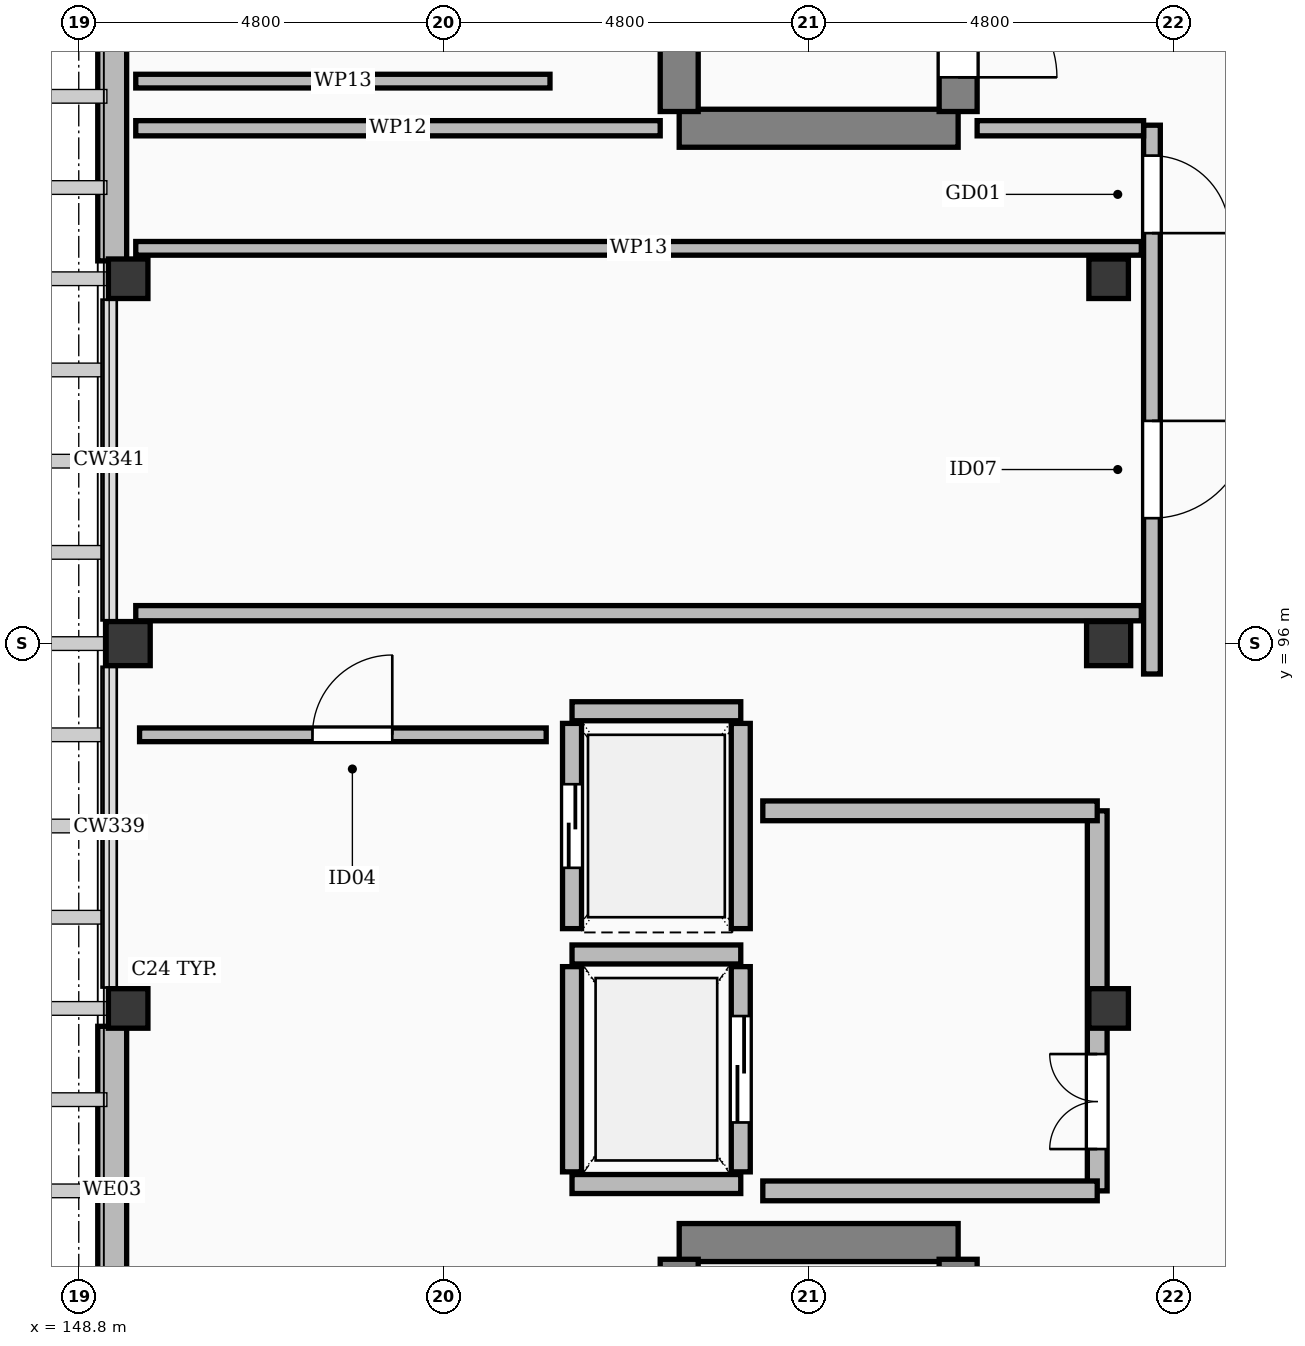
"""IFC4 building model, lengths in metres.
Left out: names, types, materials, properties, quantities, classifications, styles, units other than length and angle.
Written with IfcOpenShell. Run it as: python <this file> out.ifc"""

import sys

from ifc_helpers import new_model, si_unit, direction, frame, frame_2d, origin, origin_2d, place, context, subcontext, project, spatial, rectangle, extrude, element, fill, save


model = new_model("IFC4")
c1 = context("Model", 3, precision=1e-05, world=origin(), true_north=direction((0.0, 1.0)))
c2 = subcontext(c1, "Body", "Model", "MODEL_VIEW")
j1 = project(units=[si_unit("LENGTHUNIT", "METRE"), si_unit("PLANEANGLEUNIT", "RADIAN")], contexts=[c1])
p1 = place(None, origin())
s1 = spatial("IfcSite", under=j1, at=p1, CompositionType="ELEMENT")
p2 = place(p1, origin())
s2 = spatial("IfcBuilding", under=s1, at=p2, CompositionType="ELEMENT")
p3 = place(p2, frame((0.0, 0.0, 46.5)))
s3 = spatial("IfcBuildingStorey", under=s2, at=p3, CompositionType="ELEMENT", Elevation=46.5)
for number, where, z_axis, x_axis in (
    (1, (149.45, 96.0, 0.0), (0.0, 0.0, 1.0), (1.0, 0.0, 0.0)),
    (2, (162.35, 96.0, 0.0), (0.0, 0.0, 1.0), (1.0, 0.0, 0.0)),
):
    element("IfcColumn", number, at=place(p3, frame(where, z_axis=z_axis, x_axis=x_axis)), inside=s3, PredefinedType="COLUMN", context=c2, shape_type="SweptSolid", body=[
        extrude(rectangle(XDim=0.58, YDim=0.58, at=origin_2d()), origin(), (0.0, 0.0, 1.0), 3.9),
    ])
for number, where, z_axis, x_axis in (
    (3, (149.45, 91.2, 0.0), (0.0, 0.0, 1.0), (1.0, 0.0, 0.0)),
    (4, (149.45, 100.8, 0.0), (0.0, 0.0, 1.0), (1.0, 0.0, 0.0)),
    (5, (162.35, 91.2, 0.0), (0.0, 0.0, 1.0), (1.0, 0.0, 0.0)),
    (6, (162.35, 100.8, 0.0), (0.0, 0.0, 1.0), (1.0, 0.0, 0.0)),
):
    element("IfcColumn", number, at=place(p3, frame(where, z_axis=z_axis, x_axis=x_axis)), inside=s3, PredefinedType="COLUMN", context=c2, shape_type="SweptSolid", body=[
        extrude(rectangle(XDim=0.52, YDim=0.52, at=origin_2d()), origin(), (0.0, 0.0, 1.0), 3.9),
    ])
for number, where, z_axis, x_axis in (
    (7, (149.24, 86.665, 0.0), (0.0, 0.0, 1.0), (0.0, 1.0, 0.0)),
    (8, (149.24, 101.035, 0.0), (0.0, 0.0, 1.0), (0.0, 1.0, 0.0)),
):
    element("IfcWall", number, at=place(p3, frame(where, z_axis=z_axis, x_axis=x_axis)), inside=s3, PredefinedType="SOLIDWALL", context=c2, shape_type="SweptSolid", body=[
        extrude(rectangle(XDim=4.3, YDim=0.38, at=frame_2d((2.15, 0.0))), origin(), (0.0, 0.0, 1.0), 3.072),
    ])
p4 = place(p3, frame((156.7, 88.12, 0.0), z_axis=(0.0, 0.0, 1.0), x_axis=(1.0, 0.0, 0.0)))
e9 = element("IfcWall", 9, at=p4, inside=s3, PredefinedType="SHEAR", context=c2, shape_type="SweptSolid", body=[
    extrude(rectangle(XDim=3.67, YDim=0.5, at=frame_2d((1.835, 0.0))), origin(), (0.0, 0.0, 1.0), 3.68),
])
p5 = place(p3, frame((156.7, 77.4, 0.0), z_axis=(0.0, 0.0, 1.0), x_axis=(0.0, 1.0, 0.0)))
e10 = element("IfcWall", 10, at=p5, inside=s3, PredefinedType="SHEAR", context=c2, shape_type="SweptSolid", body=[
    extrude(rectangle(XDim=10.5, YDim=0.5, at=frame_2d((5.25, 0.0))), origin(), (0.0, 0.0, 1.0), 3.68),
])
p6 = place(p3, frame((160.37, 77.4, 0.0), z_axis=(0.0, 0.0, 1.0), x_axis=(0.0, 1.0, 0.0)))
e11 = element("IfcWall", 11, at=p6, inside=s3, PredefinedType="SHEAR", context=c2, shape_type="SweptSolid", body=[
    extrude(rectangle(XDim=10.5, YDim=0.5, at=frame_2d((5.25, 0.0))), origin(), (0.0, 0.0, 1.0), 3.68),
])
p7 = place(p6, frame((0.45, 0.0, 0.0)))
e12 = element("IfcOpeningElement", 12, at=p7, cuts=e11, PredefinedType="OPENING", context=c2, shape_type="SweptSolid", body=[
    extrude(rectangle(XDim=1.3, YDim=2.15, at=frame_2d((0.65, 1.075))), frame((0.0, 0.262, 0.0), z_axis=(0.0, -1.0, 0.0), x_axis=(1.0, 0.0, 0.0)), (0.0, 0.0, 1.0), 0.524),
])
for number, where, z_axis, x_axis in (
    (13, (155.29, 88.89, 0.0), (0.0, 0.0, 1.0), (1.0, 0.0, 0.0)),
    (14, (155.29, 91.91, 0.0), (0.0, 0.0, 1.0), (1.0, 0.0, 0.0)),
):
    element("IfcWall", number, at=place(p3, frame(where, z_axis=z_axis, x_axis=x_axis)), inside=s3, PredefinedType="SOLIDWALL", context=c2, shape_type="SweptSolid", body=[
        extrude(rectangle(XDim=2.22, YDim=0.25, at=frame_2d((1.11, 0.0))), origin(), (0.0, 0.0, 1.0), 3.68),
    ])
p8 = place(p3, frame((155.29, 89.05, 0.0), z_axis=(0.0, 0.0, 1.0), x_axis=(0.0, 1.0, 0.0)))
e15 = element("IfcWall", 15, at=p8, inside=s3, PredefinedType="SOLIDWALL", context=c2, shape_type="SweptSolid", body=[
    extrude(rectangle(XDim=2.7, YDim=0.25, at=frame_2d((1.35, 0.0))), origin(), (0.0, 0.0, 1.0), 3.072),
])
p9 = place(p3, frame((157.51, 89.05, 0.0), z_axis=(0.0, 0.0, 1.0), x_axis=(0.0, 1.0, 0.0)))
e16 = element("IfcWall", 16, at=p9, inside=s3, PredefinedType="SOLIDWALL", context=c2, shape_type="SweptSolid", body=[
    extrude(rectangle(XDim=2.7, YDim=0.25, at=frame_2d((1.35, 0.0))), origin(), (0.0, 0.0, 1.0), 3.072),
])
p10 = place(p9, frame((0.65, 0.0, 0.0)))
e17 = element("IfcOpeningElement", 17, at=p10, cuts=e16, PredefinedType="OPENING", context=c2, shape_type="SweptSolid", body=[
    extrude(rectangle(XDim=1.4, YDim=2.3, at=frame_2d((0.7, 1.15))), frame((0.0, 0.137, 0.0), z_axis=(0.0, -1.0, 0.0), x_axis=(1.0, 0.0, 0.0)), (0.0, 0.0, 1.0), 0.274),
])
p11 = place(p3, frame((155.29, 95.11, 0.0), z_axis=(0.0, 0.0, 1.0), x_axis=(1.0, 0.0, 0.0)))
e18 = element("IfcWall", 18, at=p11, inside=s3, PredefinedType="SOLIDWALL", context=c2, shape_type="SweptSolid", body=[
    extrude(rectangle(XDim=2.22, YDim=0.25, at=frame_2d((1.11, 0.0))), origin(), (0.0, 0.0, 1.0), 3.68),
])
p12 = place(p3, frame((155.29, 92.25, 0.0), z_axis=(0.0, 0.0, 1.0), x_axis=(0.0, 1.0, 0.0)))
e19 = element("IfcWall", 19, at=p12, inside=s3, PredefinedType="SOLIDWALL", context=c2, shape_type="SweptSolid", body=[
    extrude(rectangle(XDim=2.7, YDim=0.25, at=frame_2d((1.35, 0.0))), origin(), (0.0, 0.0, 1.0), 3.68),
])
p13 = place(p12, frame((0.8, 0.0, 0.0)))
e20 = element("IfcOpeningElement", 20, at=p13, cuts=e19, PredefinedType="OPENING", context=c2, shape_type="SweptSolid", body=[
    extrude(rectangle(XDim=1.1, YDim=2.2, at=frame_2d((0.55, 1.1))), frame((0.0, 0.137, 0.0), z_axis=(0.0, -1.0, 0.0), x_axis=(1.0, 0.0, 0.0)), (0.0, 0.0, 1.0), 0.274),
])
p14 = place(p3, frame((157.51, 92.25, 0.0), z_axis=(0.0, 0.0, 1.0), x_axis=(0.0, 1.0, 0.0)))
e21 = element("IfcWall", 21, at=p14, inside=s3, PredefinedType="SOLIDWALL", context=c2, shape_type="SweptSolid", body=[
    extrude(rectangle(XDim=2.7, YDim=0.25, at=frame_2d((1.35, 0.0))), origin(), (0.0, 0.0, 1.0), 3.68),
])
p15 = place(p3, frame((162.2, 88.8, 0.0), z_axis=(0.0, 0.0, 1.0), x_axis=(0.0, 1.0, 0.0)))
e22 = element("IfcWall", 22, at=p15, inside=s3, PredefinedType="SOLIDWALL", context=c2, shape_type="SweptSolid", body=[
    extrude(rectangle(XDim=5.0, YDim=0.26, at=frame_2d((2.5, 0.0))), origin(), (0.0, 0.0, 1.0), 3.072),
])
p16 = place(p15, frame((0.55, 0.0, 0.0)))
e23 = element("IfcOpeningElement", 23, at=p16, cuts=e22, PredefinedType="OPENING", context=c2, shape_type="SweptSolid", body=[
    extrude(rectangle(XDim=1.25, YDim=2.15, at=frame_2d((0.625, 1.075))), frame((0.0, 0.142, 0.0), z_axis=(0.0, -1.0, 0.0), x_axis=(1.0, 0.0, 0.0)), (0.0, 0.0, 1.0), 0.284),
])
for number, where, z_axis, x_axis in (
    (24, (157.8, 88.8, 0.0), (0.0, 0.0, 1.0), (1.0, 0.0, 0.0)),
    (25, (157.8, 93.8, 0.0), (0.0, 0.0, 1.0), (1.0, 0.0, 0.0)),
):
    element("IfcWall", number, at=place(p3, frame(where, z_axis=z_axis, x_axis=x_axis)), inside=s3, PredefinedType="SOLIDWALL", context=c2, shape_type="SweptSolid", body=[
        extrude(rectangle(XDim=4.4, YDim=0.26, at=frame_2d((2.2, 0.0))), origin(), (0.0, 0.0, 1.0), 3.072),
    ])
p17 = place(p3, frame((156.7, 102.78, 0.0), z_axis=(0.0, 0.0, 1.0), x_axis=(1.0, 0.0, 0.0)))
e26 = element("IfcWall", 26, at=p17, inside=s3, PredefinedType="SHEAR", context=c2, shape_type="SweptSolid", body=[
    extrude(rectangle(XDim=3.67, YDim=0.5, at=frame_2d((1.835, 0.0))), origin(), (0.0, 0.0, 1.0), 3.68),
])
p18 = place(p3, frame((156.7, 103.0, 0.0), z_axis=(0.0, 0.0, 1.0), x_axis=(0.0, 1.0, 0.0)))
e27 = element("IfcWall", 27, at=p18, inside=s3, PredefinedType="SHEAR", context=c2, shape_type="SweptSolid", body=[
    extrude(rectangle(XDim=10.5, YDim=0.5, at=frame_2d((5.25, 0.0))), origin(), (0.0, 0.0, 1.0), 3.68),
])
p19 = place(p3, frame((160.37, 103.0, 0.0), z_axis=(0.0, 0.0, 1.0), x_axis=(0.0, 1.0, 0.0)))
e28 = element("IfcWall", 28, at=p19, inside=s3, PredefinedType="SHEAR", context=c2, shape_type="SweptSolid", body=[
    extrude(rectangle(XDim=10.5, YDim=0.5, at=frame_2d((5.25, 0.0))), origin(), (0.0, 0.0, 1.0), 3.68),
])
p20 = place(p19, frame((0.45, 0.0, 0.0)))
e29 = element("IfcOpeningElement", 29, at=p20, cuts=e28, PredefinedType="OPENING", context=c2, shape_type="SweptSolid", body=[
    extrude(rectangle(XDim=1.3, YDim=2.15, at=frame_2d((0.65, 1.075))), frame((0.0, 0.262, 0.0), z_axis=(0.0, -1.0, 0.0), x_axis=(1.0, 0.0, 0.0)), (0.0, 0.0, 1.0), 0.524),
])
p21 = place(p3, frame((162.92, 95.6, 0.0), z_axis=(0.0, 0.0, 1.0), x_axis=(0.0, 1.0, 0.0)))
e30 = element("IfcWall", 30, at=p21, inside=s3, PredefinedType="PARTITIONING", context=c2, shape_type="SweptSolid", body=[
    extrude(rectangle(XDim=7.22, YDim=0.22, at=frame_2d((3.61, 0.0))), origin(), (0.0, 0.0, 1.0), 3.072),
])
p22 = place(p21, frame((2.05, 0.0, 0.0)))
e31 = element("IfcOpeningElement", 31, at=p22, cuts=e30, PredefinedType="OPENING", context=c2, shape_type="SweptSolid", body=[
    extrude(rectangle(XDim=1.28, YDim=2.16, at=frame_2d((0.64, 1.08))), frame((0.0, 0.122, 0.0), z_axis=(0.0, -1.0, 0.0), x_axis=(1.0, 0.0, 0.0)), (0.0, 0.0, 1.0), 0.244),
])
p23 = place(p21, frame((5.8, 0.0, 0.0)))
e32 = element("IfcOpeningElement", 32, at=p23, cuts=e30, PredefinedType="OPENING", context=c2, shape_type="SweptSolid", body=[
    extrude(rectangle(XDim=1.02, YDim=2.2, at=frame_2d((0.51, 1.1))), frame((0.0, 0.122, 0.0), z_axis=(0.0, -1.0, 0.0), x_axis=(1.0, 0.0, 0.0)), (0.0, 0.0, 1.0), 0.244),
])
p24 = place(p3, frame((149.55, 96.4, 0.0), z_axis=(0.0, 0.0, 1.0), x_axis=(1.0, 0.0, 0.0)))
e33 = element("IfcWall", 33, at=p24, inside=s3, PredefinedType="PARTITIONING", context=c2, shape_type="SweptSolid", body=[
    extrude(rectangle(XDim=13.23, YDim=0.2, at=frame_2d((6.615, 0.0))), origin(), (0.0, 0.0, 1.0), 3.072),
])
p25 = place(p3, frame((149.55, 101.2, 0.0), z_axis=(0.0, 0.0, 1.0), x_axis=(1.0, 0.0, 0.0)))
e34 = element("IfcWall", 34, at=p25, inside=s3, PredefinedType="PARTITIONING", context=c2, shape_type="SweptSolid", body=[
    extrude(rectangle(XDim=13.23, YDim=0.18, at=frame_2d((6.615, 0.0))), origin(), (0.0, 0.0, 1.0), 3.072),
])
p26 = place(p3, frame((149.55, 102.78, 0.0), z_axis=(0.0, 0.0, 1.0), x_axis=(1.0, 0.0, 0.0)))
e35 = element("IfcWall", 35, at=p26, inside=s3, PredefinedType="PARTITIONING", context=c2, shape_type="SweptSolid", body=[
    extrude(rectangle(XDim=6.9, YDim=0.2, at=frame_2d((3.45, 0.0))), origin(), (0.0, 0.0, 1.0), 3.68),
])
p27 = place(p3, frame((160.62, 102.78, 0.0), z_axis=(0.0, 0.0, 1.0), x_axis=(1.0, 0.0, 0.0)))
e36 = element("IfcWall", 36, at=p27, inside=s3, PredefinedType="PARTITIONING", context=c2, shape_type="SweptSolid", body=[
    extrude(rectangle(XDim=2.19, YDim=0.2, at=frame_2d((1.095, 0.0))), origin(), (0.0, 0.0, 1.0), 3.072),
])
p28 = place(p3, frame((149.6, 94.8, 0.0), z_axis=(0.0, 0.0, 1.0), x_axis=(1.0, 0.0, 0.0)))
e37 = element("IfcWall", 37, at=p28, inside=s3, PredefinedType="PARTITIONING", context=c2, shape_type="SweptSolid", body=[
    extrude(rectangle(XDim=5.35, YDim=0.18, at=frame_2d((2.675, 0.0))), origin(), (0.0, 0.0, 1.0), 3.68),
])
p29 = place(p28, frame((2.275, 0.0, 0.0)))
e38 = element("IfcOpeningElement", 38, at=p29, cuts=e37, PredefinedType="OPENING", context=c2, shape_type="SweptSolid", body=[
    extrude(rectangle(XDim=1.05, YDim=2.18, at=frame_2d((0.525, 1.09))), frame((0.0, 0.102, 0.0), z_axis=(0.0, -1.0, 0.0), x_axis=(1.0, 0.0, 0.0)), (0.0, 0.0, 1.0), 0.204),
])
p30 = place(p3, frame((149.55, 103.4, 0.0), z_axis=(0.0, 0.0, 1.0), x_axis=(1.0, 0.0, 0.0)))
e39 = element("IfcWall", 39, at=p30, inside=s3, PredefinedType="PARTITIONING", context=c2, shape_type="SweptSolid", body=[
    extrude(rectangle(XDim=5.45, YDim=0.18, at=frame_2d((2.725, 0.0))), origin(), (0.0, 0.0, 1.0), 3.68),
])
p31 = place(p10, origin())
e40 = element("IfcDoor", 40, at=p31, inside=s3, OperationType="SLIDING_TO_LEFT", PredefinedType="DOOR", context=c2, shape_type="SweptSolid", body=[
    extrude(rectangle(XDim=1.4, YDim=2.3, at=frame_2d((0.7, 1.15))), frame((0.0, 0.025, 0.0), z_axis=(0.0, -1.0, 0.0), x_axis=(1.0, 0.0, 0.0)), (0.0, 0.0, 1.0), 0.05),
])
fill(e17, e40)
p32 = place(p13, origin())
e41 = element("IfcDoor", 41, at=p32, inside=s3, OperationType="SLIDING_TO_LEFT", PredefinedType="DOOR", context=c2, shape_type="SweptSolid", body=[
    extrude(rectangle(XDim=1.1, YDim=2.2, at=frame_2d((0.55, 1.1))), frame((0.0, 0.025, 0.0), z_axis=(0.0, -1.0, 0.0), x_axis=(1.0, 0.0, 0.0)), (0.0, 0.0, 1.0), 0.05),
])
fill(e20, e41)
p33 = place(p16, origin())
e42 = element("IfcDoor", 42, at=p33, inside=s3, OperationType="DOUBLE_DOOR_SINGLE_SWING", PredefinedType="DOOR", context=c2, shape_type="SweptSolid", body=[
    extrude(rectangle(XDim=1.25, YDim=2.15, at=frame_2d((0.625, 1.075))), frame((0.0, 0.025, 0.0), z_axis=(0.0, -1.0, 0.0), x_axis=(1.0, 0.0, 0.0)), (0.0, 0.0, 1.0), 0.05),
])
fill(e23, e42)
p34 = place(p20, frame((1.3, 0.0, 0.0), z_axis=(0.0, 0.0, 1.0), x_axis=(-1.0, 0.0, 0.0)))
e43 = element("IfcDoor", 43, at=p34, inside=s3, OperationType="SINGLE_SWING_LEFT", PredefinedType="DOOR", context=c2, shape_type="SweptSolid", body=[
    extrude(rectangle(XDim=1.3, YDim=2.15, at=frame_2d((0.65, 1.075))), frame((0.0, 0.025, 0.0), z_axis=(0.0, -1.0, 0.0), x_axis=(1.0, 0.0, 0.0)), (0.0, 0.0, 1.0), 0.05),
])
fill(e29, e43)
p35 = place(p22, frame((1.28, 0.0, 0.0), z_axis=(0.0, 0.0, 1.0), x_axis=(-1.0, 0.0, 0.0)))
e44 = element("IfcDoor", 44, at=p35, inside=s3, OperationType="SINGLE_SWING_RIGHT", PredefinedType="DOOR", context=c2, shape_type="SweptSolid", body=[
    extrude(rectangle(XDim=1.28, YDim=2.16, at=frame_2d((0.64, 1.08))), frame((0.0, 0.025, 0.0), z_axis=(0.0, -1.0, 0.0), x_axis=(1.0, 0.0, 0.0)), (0.0, 0.0, 1.0), 0.05),
])
fill(e31, e44)
p36 = place(p23, frame((1.02, 0.0, 0.0), z_axis=(0.0, 0.0, 1.0), x_axis=(-1.0, 0.0, 0.0)))
e45 = element("IfcDoor", 45, at=p36, inside=s3, OperationType="SINGLE_SWING_LEFT", PredefinedType="DOOR", context=c2, shape_type="SweptSolid", body=[
    extrude(rectangle(XDim=1.02, YDim=2.2, at=frame_2d((0.51, 1.1))), frame((0.0, 0.025, 0.0), z_axis=(0.0, -1.0, 0.0), x_axis=(1.0, 0.0, 0.0)), (0.0, 0.0, 1.0), 0.05),
])
fill(e32, e45)
p37 = place(p29, origin())
e46 = element("IfcDoor", 46, at=p37, inside=s3, OperationType="SINGLE_SWING_RIGHT", PredefinedType="DOOR", context=c2, shape_type="SweptSolid", body=[
    extrude(rectangle(XDim=1.05, YDim=2.18, at=frame_2d((0.525, 1.09))), frame((0.0, 0.025, 0.0), z_axis=(0.0, -1.0, 0.0), x_axis=(1.0, 0.0, 0.0)), (0.0, 0.0, 1.0), 0.05),
])
fill(e38, e46)
save(model, sys.argv[1])
